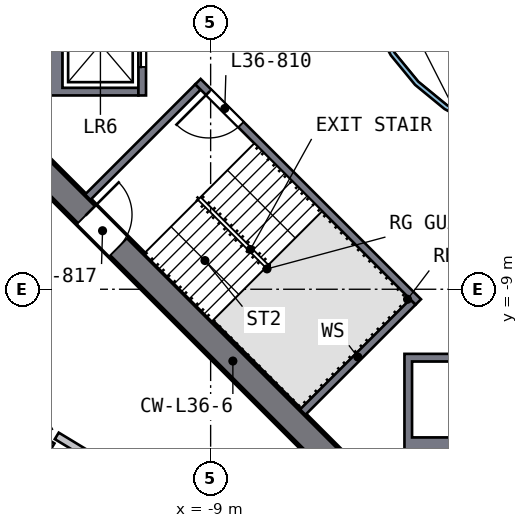
"""IFC4 building model, lengths in metres.
Left out: names, types, materials, properties, quantities, classifications, styles, units other than length and angle.
Written with IfcOpenShell. Run it as: python <this file> out.ifc"""

import sys

from ifc_helpers import new_model, si_unit, direction, frame, frame_2d, origin, place, context, subcontext, project, spatial, polyline, rectangle, outline, extrude, element, fill, save


model = new_model("IFC4")
c1 = context("Model", 3, precision=1e-05, world=origin(), true_north=direction((0.0, 1.0)))
c2 = subcontext(c1, "Body", "Model", "MODEL_VIEW")
j1 = project(units=[si_unit("LENGTHUNIT", "METRE"), si_unit("PLANEANGLEUNIT", "RADIAN")], contexts=[c1])
p1 = place(None, origin())
s1 = spatial("IfcSite", under=j1, at=p1, CompositionType="ELEMENT")
p2 = place(p1, origin())
s2 = spatial("IfcBuilding", under=s1, at=p2, CompositionType="ELEMENT")
p3 = place(p2, frame((0.0, 0.0, 150.5)))
s3 = spatial("IfcBuildingStorey", under=s2, at=p3, CompositionType="ELEMENT", Elevation=150.5)
p4 = place(p3, frame((-13.752, -5.552, 0.0), z_axis=(0.0, 0.0, 1.0), x_axis=(0.707106781, -0.707106781, 0.0)))
e1 = element("IfcWall", 1, at=p4, inside=s3, PredefinedType="SHEAR", context=c2, shape_type="SweptSolid", body=[
    extrude(rectangle(XDim=11.598, YDim=0.7, at=frame_2d((5.799, 0.0))), origin(), (0.0, 0.0, 1.0), 3.5),
])
p5 = place(p4, frame((2.099, 0.0, 0.0)))
e2 = element("IfcOpeningElement", 2, at=p5, cuts=e1, PredefinedType="OPENING", context=c2, shape_type="SweptSolid", body=[
    extrude(rectangle(XDim=1.2, YDim=2.1, at=frame_2d((0.6, 1.05))), frame((0.0, 0.36, 0.0), z_axis=(0.0, -1.0, 0.0), x_axis=(1.0, 0.0, 0.0)), (0.0, 0.0, 1.0), 0.72),
])
p6 = place(p3, origin())
e3 = element("IfcWall", 3, at=p6, inside=s3, PredefinedType="SOLIDWALL", context=c2, shape_type="SweptSolid", body=[
    extrude(outline(polyline([(-13.3, -3.9), (-13.3, -1.2), (-10.9, -1.2), (-10.9, -1.4), (-12.9, -1.4), (-12.9, -3.7), (-10.9, -3.7), (-10.9, -3.9), (-13.3, -3.9)])), origin(), (0.0, 0.0, 1.0), 3.19),
])
p7 = place(p3, frame((-10.8, -1.2, 0.0), z_axis=(0.0, 0.0, 1.0), x_axis=(0.0, -1.0, 0.0)))
e4 = element("IfcWall", 4, at=p7, inside=s3, PredefinedType="SOLIDWALL", context=c2, shape_type="SweptSolid", body=[
    extrude(rectangle(XDim=2.7, YDim=0.2, at=frame_2d((1.35, 0.0))), origin(), (0.0, 0.0, 1.0), 3.19),
])
p8 = place(p7, frame((0.75, 0.0, 0.0)))
e5 = element("IfcOpeningElement", 5, at=p8, cuts=e4, PredefinedType="OPENING", context=c2, shape_type="SweptSolid", body=[
    extrude(rectangle(XDim=1.2, YDim=2.1, at=frame_2d((0.6, 1.05))), frame((0.0, 0.11, 0.0), z_axis=(0.0, -1.0, 0.0), x_axis=(1.0, 0.0, 0.0)), (0.0, 0.0, 1.0), 0.22),
])
p9 = place(p3, origin())
e6 = element("IfcWall", 6, at=p9, inside=s3, PredefinedType="SOLIDWALL", context=c2, shape_type="SweptSolid", body=[
    extrude(outline(polyline([(-1.2, -13.3), (-3.9, -13.3), (-3.9, -10.7), (-1.2, -10.7), (-1.2, -13.3)]), holes=[polyline([(-3.7, -10.9), (-3.7, -12.9), (-1.4, -12.9), (-1.4, -10.9), (-3.7, -10.9)])]), origin(), (0.0, 0.0, 1.0), 3.19),
])
p10 = place(p3, frame((-3.535, -9.334, 0.0), z_axis=(0.0, 0.0, 1.0), x_axis=(-0.707106781, 0.707106781, 0.0)))
e7 = element("IfcWall", 7, at=p10, inside=s3, PredefinedType="SOLIDWALL", context=c2, shape_type="SweptSolid", body=[
    extrude(rectangle(XDim=8.2, YDim=0.2, at=frame_2d((4.1, 0.0))), origin(), (0.0, 0.0, 1.0), 3.19),
])
p11 = place(p10, frame((6.6, 0.0, 0.0)))
e8 = element("IfcOpeningElement", 8, at=p11, cuts=e7, PredefinedType="OPENING", context=c2, shape_type="SweptSolid", body=[
    extrude(rectangle(XDim=1.2, YDim=2.1, at=frame_2d((0.6, 1.05))), frame((0.0, 0.11, 0.0), z_axis=(0.0, -1.0, 0.0), x_axis=(1.0, 0.0, 0.0)), (0.0, 0.0, 1.0), 0.22),
])
for number, where, z_axis, x_axis in (
    (9, (-9.334, -3.677, 0.0), (0.0, 0.0, 1.0), (-0.707, -0.707, 0.0)),
    (10, (-3.677, -9.334, 0.0), (0.0, 0.0, 1.0), (-0.707, -0.707, 0.0)),
):
    element("IfcWall", number, at=place(p3, frame(where, z_axis=z_axis, x_axis=x_axis)), inside=s3, PredefinedType="SOLIDWALL", context=c2, shape_type="SweptSolid", body=[
        extrude(rectangle(XDim=4.1, YDim=0.2, at=frame_2d((2.05, 0.0))), origin(), (0.0, 0.0, 1.0), 3.19),
    ])
p12 = place(p3, origin())
e11 = element("IfcWall", 11, at=p12, inside=s3, PredefinedType="SOLIDWALL", context=c2, shape_type="SweptSolid", body=[
    extrude(outline(polyline([(5.021, -0.999), (4.73, -1.959), (4.257, -2.844), (3.62, -3.62), (2.844, -4.257), (1.959, -4.73), (0.999, -5.021), (0.0, -5.12), (-0.999, -5.021), (-1.959, -4.73), (-2.844, -4.257), (-3.62, -3.62), (-4.257, -2.844), (-4.73, -1.959), (-5.021, -0.999), (-5.12, 0.0), (-5.021, 0.999), (-4.73, 1.959), (-4.257, 2.844), (-3.62, 3.62), (-2.844, 4.257), (-1.959, 4.73), (-0.999, 5.021), (0.0, 5.12), (0.999, 5.021), (1.959, 4.73), (2.844, 4.257), (3.62, 3.62), (4.257, 2.844), (4.73, 1.959), (5.021, 0.999), (5.12, 0.0), (5.021, -0.999)]), holes=[polyline([(4.904, 0.976), (4.619, 1.913), (4.157, 2.778), (3.535, 3.535), (2.778, 4.157), (1.913, 4.619), (0.976, 4.904), (0.0, 5.0), (-0.976, 4.904), (-1.913, 4.619), (-2.778, 4.157), (-3.535, 3.535), (-4.157, 2.778), (-4.619, 1.913), (-4.904, 0.976), (-5.0, 0.0), (-4.904, -0.976), (-4.619, -1.913), (-4.157, -2.778), (-3.535, -3.535), (-2.778, -4.157), (-1.913, -4.619), (-0.976, -4.904), (0.0, -5.0), (0.976, -4.904), (1.913, -4.619), (2.778, -4.157), (3.535, -3.535), (4.157, -2.778), (4.619, -1.913), (4.904, -0.976), (5.0, 0.0), (4.904, 0.976)])]), origin(), (0.0, 0.0, 1.0), 3.19),
])
p13 = place(p3, frame((-13.048, -12.859, 0.0), z_axis=(0.0, 0.0, 1.0), x_axis=(0.855337648, -0.518070948, 0.0)))
e12 = element("IfcWall", 12, at=p13, inside=s3, PredefinedType="SOLIDWALL", context=c2, shape_type="SweptSolid", body=[
    extrude(rectangle(XDim=3.4, YDim=0.2, at=frame_2d((1.7, 0.0))), origin(), (0.0, 0.0, 1.0), 3.19),
])
p14 = place(p3, frame((-13.152, -13.03, 0.0), z_axis=(0.0, 0.0, 1.0), x_axis=(-0.518015125, -0.855371458, 0.0)))
e13 = element("IfcWall", 13, at=p14, inside=s3, PredefinedType="PARTITIONING", context=c2, shape_type="SweptSolid", body=[
    extrude(rectangle(XDim=2.7, YDim=0.1, at=frame_2d((1.35, 0.0))), origin(), (0.0, 0.0, 1.0), 3.19),
])
p15 = place(p8, origin())
e14 = element("IfcDoor", 14, at=p15, inside=s3, OperationType="DOUBLE_DOOR_SLIDING", PredefinedType="DOOR", context=c2, shape_type="SweptSolid", body=[
    extrude(rectangle(XDim=1.2, YDim=2.1, at=frame_2d((0.6, 1.05))), frame((0.0, 0.025, 0.0), z_axis=(0.0, -1.0, 0.0), x_axis=(1.0, 0.0, 0.0)), (0.0, 0.0, 1.0), 0.05),
])
fill(e5, e14)
p16 = place(p11, origin())
e15 = element("IfcDoor", 15, at=p16, inside=s3, OperationType="SINGLE_SWING_RIGHT", PredefinedType="DOOR", context=c2, shape_type="SweptSolid", body=[
    extrude(rectangle(XDim=1.2, YDim=2.1, at=frame_2d((0.6, 1.05))), frame((0.0, 0.025, 0.0), z_axis=(0.0, -1.0, 0.0), x_axis=(1.0, 0.0, 0.0)), (0.0, 0.0, 1.0), 0.05),
])
fill(e8, e15)
p17 = place(p5, origin())
e16 = element("IfcDoor", 16, at=p17, inside=s3, OperationType="SINGLE_SWING_LEFT", PredefinedType="DOOR", context=c2, shape_type="SweptSolid", body=[
    extrude(rectangle(XDim=1.2, YDim=2.1, at=frame_2d((0.6, 1.05))), frame((0.0, 0.025, 0.0), z_axis=(0.0, -1.0, 0.0), x_axis=(1.0, 0.0, 0.0)), (0.0, 0.0, 1.0), 0.05),
])
fill(e2, e16)
save(model, sys.argv[1])
